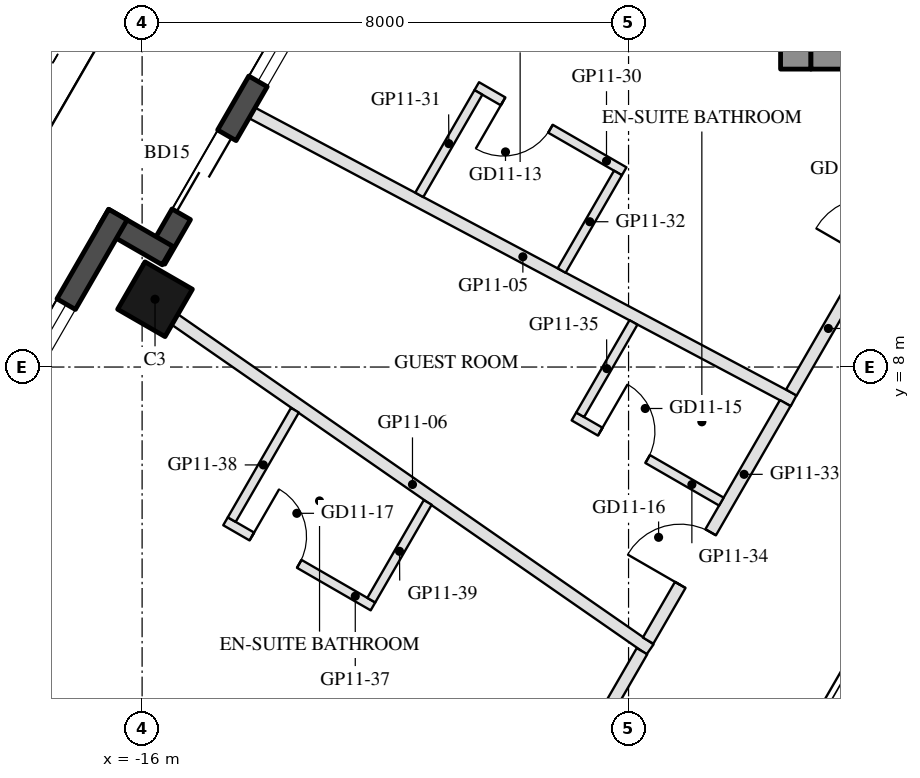
"""IFC4 building model, lengths in metres.
Left out: names, types, materials, properties, quantities, classifications, styles, units other than length and angle.
Written with IfcOpenShell. Run it as: python <this file> out.ifc"""

import sys

from ifc_helpers import new_model, si_unit, direction, frame, frame_2d, origin, origin_2d, place, context, subcontext, project, spatial, rectangle, hollow_rectangle, extrude, element, fill, save


model = new_model("IFC4")
c1 = context("Model", 3, precision=1e-05, world=origin(), true_north=direction((0.0, 1.0)))
c2 = subcontext(c1, "Body", "Model", "MODEL_VIEW")
j1 = project(units=[si_unit("LENGTHUNIT", "METRE"), si_unit("PLANEANGLEUNIT", "RADIAN")], contexts=[c1])
p1 = place(None, origin())
s1 = spatial("IfcSite", under=j1, at=p1, CompositionType="ELEMENT")
p2 = place(p1, origin())
s2 = spatial("IfcBuilding", under=s1, at=p2, CompositionType="ELEMENT")
p3 = place(p2, frame((0.0, 0.0, 124.2)))
s3 = spatial("IfcBuildingStorey", under=s2, at=p3, CompositionType="ELEMENT", Elevation=124.2)
p4 = place(p3, frame((-15.788, 9.115, 0.0), z_axis=(0.0, 0.0, 1.0), x_axis=(0.5, 0.866025403784, 0.0)))
e1 = element("IfcColumn", 1, at=p4, inside=s3, PredefinedType="COLUMN", context=c2, shape_type="SweptSolid", body=[
    extrude(hollow_rectangle(XDim=0.9, YDim=0.9, WallThickness=0.04, at=origin_2d()), origin(), (0.0, 0.0, 1.0), 3.7),
])
p5 = place(p3, frame((-12.409, 15.617, 0.0), z_axis=(0.0, 0.0, 1.0), x_axis=(-0.500003597184, -0.866023326939, 0.0)))
e2 = element("IfcWall", 2, at=p5, inside=s3, PredefinedType="SOLIDWALL", context=c2, shape_type="SweptSolid", body=[
    extrude(rectangle(XDim=6.74, YDim=0.35, at=frame_2d((3.37, 0.0))), origin(), (0.0, 0.0, 1.0), 3.55),
])
p6 = place(p5, frame((0.77, 0.0, 0.3)))
e3 = element("IfcOpeningElement", 3, at=p6, cuts=e2, PredefinedType="OPENING", context=c2, shape_type="SweptSolid", body=[
    extrude(rectangle(XDim=2.6, YDim=2.65, at=frame_2d((1.3, 1.325))), frame((0.0, 0.185, 0.0), z_axis=(0.0, -1.0, 0.0), x_axis=(1.0, 0.0, 0.0)), (0.0, 0.0, 1.0), 0.37),
])
p7 = place(p5, frame((4.394, 0.0, 0.0)))
e4 = element("IfcOpeningElement", 4, at=p7, cuts=e2, PredefinedType="OPENING", context=c2, shape_type="SweptSolid", body=[
    extrude(rectangle(XDim=1.5, YDim=2.4, at=frame_2d((0.75, 1.2))), frame((0.0, 0.185, 0.0), z_axis=(0.0, -1.0, 0.0), x_axis=(1.0, 0.0, 0.0)), (0.0, 0.0, 1.0), 0.37),
])
p8 = place(p3, frame((-15.581, 9.833, 0.0), z_axis=(0.0, 0.0, 1.0), x_axis=(-0.866055662726, 0.499947586314, 0.0)))
e5 = element("IfcWall", 5, at=p8, inside=s3, PredefinedType="SOLIDWALL", context=c2, shape_type="SweptSolid", body=[
    extrude(rectangle(XDim=1.22, YDim=0.35, at=frame_2d((0.61, 0.0))), origin(), (0.0, 0.0, 1.0), 3.55),
])
p9 = place(p3, frame((-16.398, 10.507, 0.0), z_axis=(0.0, 0.0, 1.0), x_axis=(-0.499999142773, -0.866025898704, 0.0)))
e6 = element("IfcWall", 6, at=p9, inside=s3, PredefinedType="SOLIDWALL", context=c2, shape_type="SweptSolid", body=[
    extrude(rectangle(XDim=9.7, YDim=0.35, at=frame_2d((4.85, 0.0))), origin(), (0.0, 0.0, 1.0), 3.55),
])
p10 = place(p9, frame((5.6, 0.0, 0.0)))
e7 = element("IfcOpeningElement", 7, at=p10, cuts=e6, PredefinedType="OPENING", context=c2, shape_type="SweptSolid", body=[
    extrude(rectangle(XDim=2.4, YDim=2.4, at=frame_2d((1.2, 1.2))), frame((0.0, 0.185, 0.0), z_axis=(0.0, -1.0, 0.0), x_axis=(1.0, 0.0, 0.0)), (0.0, 0.0, 1.0), 0.37),
])
p11 = place(p9, frame((1.7, 0.0, 0.3)))
e8 = element("IfcOpeningElement", 8, at=p11, cuts=e6, PredefinedType="OPENING", context=c2, shape_type="SweptSolid", body=[
    extrude(rectangle(XDim=1.6, YDim=2.65, at=frame_2d((0.8, 1.325))), frame((0.0, 0.185, 0.0), z_axis=(0.0, -1.0, 0.0), x_axis=(1.0, 0.0, 0.0)), (0.0, 0.0, 1.0), 0.37),
])
p12 = place(p9, frame((3.6, 0.0, 0.3)))
e9 = element("IfcOpeningElement", 9, at=p12, cuts=e6, PredefinedType="OPENING", context=c2, shape_type="SweptSolid", body=[
    extrude(rectangle(XDim=1.6, YDim=2.65, at=frame_2d((0.8, 1.325))), frame((0.0, 0.185, 0.0), z_axis=(0.0, -1.0, 0.0), x_axis=(1.0, 0.0, 0.0)), (0.0, 0.0, 1.0), 0.37),
])
p13 = place(p3, frame((-5.25, 12.9, 0.0), z_axis=(0.0, 0.0, 1.0), x_axis=(0.0, 1.0, 0.0)))
e10 = element("IfcWall", 10, at=p13, inside=s3, PredefinedType="SHEAR", context=c2, shape_type="SweptSolid", body=[
    extrude(rectangle(XDim=14.837, YDim=0.5, at=frame_2d((7.418, 0.0))), origin(), (0.0, 0.0, 1.0), 3.5),
])
p14 = place(p3, frame((5.0, 13.1, 0.0), z_axis=(0.0, 0.0, 1.0), x_axis=(-1.0, 0.0, 0.0)))
e11 = element("IfcWall", 11, at=p14, inside=s3, PredefinedType="SHEAR", context=c2, shape_type="SweptSolid", body=[
    extrude(rectangle(XDim=10.0, YDim=0.4, at=frame_2d((5.0, 0.0))), origin(), (0.0, 0.0, 1.0), 3.5),
])
p15 = place(p14, frame((3.55, 0.0, 0.0)))
e12 = element("IfcOpeningElement", 12, at=p15, cuts=e11, PredefinedType="OPENING", context=c2, shape_type="SweptSolid", body=[
    extrude(rectangle(XDim=1.1, YDim=2.1, at=frame_2d((0.55, 1.05))), frame((0.0, 0.21, 0.0), z_axis=(0.0, -1.0, 0.0), x_axis=(1.0, 0.0, 0.0)), (0.0, 0.0, 1.0), 0.42),
])
p16 = place(p14, frame((5.85, 0.0, 0.0)))
e13 = element("IfcOpeningElement", 13, at=p16, cuts=e11, PredefinedType="OPENING", context=c2, shape_type="SweptSolid", body=[
    extrude(rectangle(XDim=1.4, YDim=2.1, at=frame_2d((0.7, 1.05))), frame((0.0, 0.21, 0.0), z_axis=(0.0, -1.0, 0.0), x_axis=(1.0, 0.0, 0.0)), (0.0, 0.0, 1.0), 0.42),
])
p17 = place(p3, frame((-14.192, 12.179, 0.0), z_axis=(0.0, 0.0, 1.0), x_axis=(0.883106944183, -0.469171743753, 0.0)))
e14 = element("IfcWall", 14, at=p17, inside=s3, PredefinedType="PARTITIONING", context=c2, shape_type="SweptSolid", body=[
    extrude(rectangle(XDim=10.086, YDim=0.2, at=frame_2d((5.043, 0.0))), origin(), (0.0, 0.0, 1.0), 2.95),
])
p18 = place(p3, frame((-15.46, 8.781, 0.0), z_axis=(0.0, 0.0, 1.0), x_axis=(0.82142273434, -0.570319815113, 0.0)))
e15 = element("IfcWall", 15, at=p18, inside=s3, PredefinedType="PARTITIONING", context=c2, shape_type="SweptSolid", body=[
    extrude(rectangle(XDim=9.513, YDim=0.2, at=frame_2d((4.756, 0.0))), origin(), (0.0, 0.0, 1.0), 2.95),
])
p19 = place(p3, frame((-5.323, 7.581, 0.0), z_axis=(0.0, 0.0, 1.0), x_axis=(0.49998410452, 0.866034580849, 0.0)))
e16 = element("IfcWall", 16, at=p19, inside=s3, PredefinedType="PARTITIONING", context=c2, shape_type="SweptSolid", body=[
    extrude(rectangle(XDim=6.085, YDim=0.2, at=frame_2d((3.042, 0.0))), origin(), (0.0, 0.0, 1.0), 2.95),
])
p20 = place(p19, frame((2.542, 0.0, 0.0)))
e17 = element("IfcOpeningElement", 17, at=p20, cuts=e16, PredefinedType="OPENING", context=c2, shape_type="SweptSolid", body=[
    extrude(rectangle(XDim=1.0, YDim=2.1, at=frame_2d((0.5, 1.05))), frame((0.0, 0.11, 0.0), z_axis=(0.0, -1.0, 0.0), x_axis=(1.0, 0.0, 0.0)), (0.0, 0.0, 1.0), 0.22),
])
p21 = place(p3, frame((-8.072, 11.219, 0.0), z_axis=(0.0, 0.0, 1.0), x_axis=(-0.866034573852, 0.49998411664, 0.0)))
e18 = element("IfcWall", 18, at=p21, inside=s3, PredefinedType="PARTITIONING", context=c2, shape_type="SweptSolid", body=[
    extrude(rectangle(XDim=2.8, YDim=0.15, at=frame_2d((1.4, 0.0))), origin(), (0.0, 0.0, 1.0), 3.55),
])
p22 = place(p21, frame((1.4, 0.0, 0.0)))
e19 = element("IfcOpeningElement", 19, at=p22, cuts=e18, PredefinedType="OPENING", context=c2, shape_type="SweptSolid", body=[
    extrude(rectangle(XDim=0.9, YDim=2.1, at=frame_2d((0.45, 1.05))), frame((0.0, 0.085, 0.0), z_axis=(0.0, -1.0, 0.0), x_axis=(1.0, 0.0, 0.0)), (0.0, 0.0, 1.0), 0.17),
])
p23 = place(p3, frame((-10.469, 12.517, 0.0), z_axis=(0.0, 0.0, 1.0), x_axis=(-0.500051850797, -0.865995465643, 0.0)))
e20 = element("IfcWall", 20, at=p23, inside=s3, PredefinedType="PARTITIONING", context=c2, shape_type="SweptSolid", body=[
    extrude(rectangle(XDim=1.946, YDim=0.15, at=frame_2d((0.973, 0.0))), origin(), (0.0, 0.0, 1.0), 2.95),
])
p24 = place(p3, frame((-8.174, 11.192, 0.0), z_axis=(0.0, 0.0, 1.0), x_axis=(-0.500022870649, -0.866012199007, 0.0)))
e21 = element("IfcWall", 21, at=p24, inside=s3, PredefinedType="PARTITIONING", context=c2, shape_type="SweptSolid", body=[
    extrude(rectangle(XDim=1.853, YDim=0.15, at=frame_2d((0.926, 0.0))), origin(), (0.0, 0.0, 1.0), 2.95),
])
p25 = place(p3, frame((-7.679, 3.5, 0.0), z_axis=(0.0, 0.0, 1.0), x_axis=(0.500026934738, 0.866009852448, 0.0)))
e22 = element("IfcWall", 22, at=p25, inside=s3, PredefinedType="PARTITIONING", context=c2, shape_type="SweptSolid", body=[
    extrude(rectangle(XDim=4.511, YDim=0.2, at=frame_2d((2.256, 0.0))), origin(), (0.0, 0.0, 1.0), 2.95),
])
p26 = place(p25, frame((1.058, 0.0, 0.0)))
e23 = element("IfcOpeningElement", 23, at=p26, cuts=e22, PredefinedType="OPENING", context=c2, shape_type="SweptSolid", body=[
    extrude(rectangle(XDim=1.0, YDim=2.1, at=frame_2d((0.5, 1.05))), frame((0.0, 0.11, 0.0), z_axis=(0.0, -1.0, 0.0), x_axis=(1.0, 0.0, 0.0)), (0.0, 0.0, 1.0), 0.22),
])
p27 = place(p3, frame((-8.899, 7.187, 0.0), z_axis=(0.0, 0.0, 1.0), x_axis=(0.866056369097, -0.49994636267, 0.0)))
e24 = element("IfcWall", 24, at=p27, inside=s3, PredefinedType="PARTITIONING", context=c2, shape_type="SweptSolid", body=[
    extrude(rectangle(XDim=2.8, YDim=0.15, at=frame_2d((1.4, 0.0))), origin(), (0.0, 0.0, 1.0), 3.55),
])
p28 = place(p27, frame((0.5, 0.0, 0.0)))
e25 = element("IfcOpeningElement", 25, at=p28, cuts=e24, PredefinedType="OPENING", context=c2, shape_type="SweptSolid", body=[
    extrude(rectangle(XDim=0.9, YDim=2.1, at=frame_2d((0.45, 1.05))), frame((0.0, 0.085, 0.0), z_axis=(0.0, -1.0, 0.0), x_axis=(1.0, 0.0, 0.0)), (0.0, 0.0, 1.0), 0.17),
])
p29 = place(p3, frame((-7.919, 8.734, 0.0), z_axis=(0.0, 0.0, 1.0), x_axis=(-0.499971461383, -0.866041879935, 0.0)))
e26 = element("IfcWall", 26, at=p29, inside=s3, PredefinedType="PARTITIONING", context=c2, shape_type="SweptSolid", body=[
    extrude(rectangle(XDim=1.754, YDim=0.15, at=frame_2d((0.877, 0.0))), origin(), (0.0, 0.0, 1.0), 3.55),
])
p30 = place(p3, frame((-12.269, -4.45, 0.0), z_axis=(0.0, 0.0, 1.0), x_axis=(0.500004878216, 0.866022587327, 0.0)))
e27 = element("IfcWall", 27, at=p30, inside=s3, PredefinedType="PARTITIONING", context=c2, shape_type="SweptSolid", body=[
    extrude(rectangle(XDim=8.979, YDim=0.2, at=frame_2d((4.49, 0.0))), origin(), (0.0, 0.0, 1.0), 2.95),
])
p31 = place(p30, frame((3.99, 0.0, 0.0)))
e28 = element("IfcOpeningElement", 28, at=p31, cuts=e27, PredefinedType="OPENING", context=c2, shape_type="SweptSolid", body=[
    extrude(rectangle(XDim=1.0, YDim=2.1, at=frame_2d((0.5, 1.05))), frame((0.0, 0.11, 0.0), z_axis=(0.0, -1.0, 0.0), x_axis=(1.0, 0.0, 0.0)), (0.0, 0.0, 1.0), 0.22),
])
p32 = place(p3, frame((-14.628, 5.463, 0.0), z_axis=(0.0, 0.0, 1.0), x_axis=(0.866056369097, -0.49994636267, 0.0)))
e29 = element("IfcWall", 29, at=p32, inside=s3, PredefinedType="PARTITIONING", context=c2, shape_type="SweptSolid", body=[
    extrude(rectangle(XDim=2.8, YDim=0.15, at=frame_2d((1.4, 0.0))), origin(), (0.0, 0.0, 1.0), 3.55),
])
p33 = place(p32, frame((0.5, 0.0, 0.0)))
e30 = element("IfcOpeningElement", 30, at=p33, cuts=e29, PredefinedType="OPENING", context=c2, shape_type="SweptSolid", body=[
    extrude(rectangle(XDim=0.9, YDim=2.1, at=frame_2d((0.45, 1.05))), frame((0.0, 0.085, 0.0), z_axis=(0.0, -1.0, 0.0), x_axis=(1.0, 0.0, 0.0)), (0.0, 0.0, 1.0), 0.17),
])
p34 = place(p3, frame((-13.487, 7.29, 0.0), z_axis=(0.0, 0.0, 1.0), x_axis=(-0.500044586128, -0.865999660441, 0.0)))
e31 = element("IfcWall", 31, at=p34, inside=s3, PredefinedType="PARTITIONING", context=c2, shape_type="SweptSolid", body=[
    extrude(rectangle(XDim=2.077, YDim=0.15, at=frame_2d((1.039, 0.0))), origin(), (0.0, 0.0, 1.0), 3.55),
])
p35 = place(p3, frame((-11.303, 5.773, 0.0), z_axis=(0.0, 0.0, 1.0), x_axis=(-0.500071598593, -0.865984062371, 0.0)))
e32 = element("IfcWall", 32, at=p35, inside=s3, PredefinedType="PARTITIONING", context=c2, shape_type="SweptSolid", body=[
    extrude(rectangle(XDim=1.856, YDim=0.15, at=frame_2d((0.928, 0.0))), origin(), (0.0, 0.0, 1.0), 3.55),
])
p36 = place(p6, origin())
e33 = element("IfcWindow", 33, at=p36, inside=s3, PartitioningType="SINGLE_PANEL", PredefinedType="WINDOW", context=c2, shape_type="SweptSolid", body=[
    extrude(rectangle(XDim=2.6, YDim=2.65, at=frame_2d((1.3, 1.325))), frame((0.0, 0.03, 0.0), z_axis=(0.0, -1.0, 0.0), x_axis=(1.0, 0.0, 0.0)), (0.0, 0.0, 1.0), 0.06),
])
fill(e3, e33)
p37 = place(p7, frame((1.5, 0.0, 0.0), z_axis=(0.0, 0.0, 1.0), x_axis=(-1.0, 0.0, 0.0)))
e34 = element("IfcDoor", 34, at=p37, inside=s3, OperationType="SLIDING_TO_LEFT", PredefinedType="DOOR", context=c2, shape_type="SweptSolid", body=[
    extrude(rectangle(XDim=1.5, YDim=2.4, at=frame_2d((0.75, 1.2))), frame((0.0, 0.025, 0.0), z_axis=(0.0, -1.0, 0.0), x_axis=(1.0, 0.0, 0.0)), (0.0, 0.0, 1.0), 0.05),
])
fill(e4, e34)
p38 = place(p11, origin())
e35 = element("IfcWindow", 35, at=p38, inside=s3, PartitioningType="SINGLE_PANEL", PredefinedType="WINDOW", context=c2, shape_type="SweptSolid", body=[
    extrude(rectangle(XDim=1.6, YDim=2.65, at=frame_2d((0.8, 1.325))), frame((0.0, 0.03, 0.0), z_axis=(0.0, -1.0, 0.0), x_axis=(1.0, 0.0, 0.0)), (0.0, 0.0, 1.0), 0.06),
])
fill(e8, e35)
p39 = place(p22, origin())
e36 = element("IfcDoor", 36, at=p39, inside=s3, OperationType="SINGLE_SWING_RIGHT", PredefinedType="DOOR", context=c2, shape_type="SweptSolid", body=[
    extrude(rectangle(XDim=0.9, YDim=2.1, at=frame_2d((0.45, 1.05))), frame((0.0, 0.025, 0.0), z_axis=(0.0, -1.0, 0.0), x_axis=(1.0, 0.0, 0.0)), (0.0, 0.0, 1.0), 0.05),
])
fill(e19, e36)
p40 = place(p28, origin())
e37 = element("IfcDoor", 37, at=p40, inside=s3, OperationType="SINGLE_SWING_LEFT", PredefinedType="DOOR", context=c2, shape_type="SweptSolid", body=[
    extrude(rectangle(XDim=0.9, YDim=2.1, at=frame_2d((0.45, 1.05))), frame((0.0, 0.025, 0.0), z_axis=(0.0, -1.0, 0.0), x_axis=(1.0, 0.0, 0.0)), (0.0, 0.0, 1.0), 0.05),
])
fill(e25, e37)
p41 = place(p26, origin())
e38 = element("IfcDoor", 38, at=p41, inside=s3, OperationType="SINGLE_SWING_LEFT", PredefinedType="DOOR", context=c2, shape_type="SweptSolid", body=[
    extrude(rectangle(XDim=1.0, YDim=2.1, at=frame_2d((0.5, 1.05))), frame((0.0, 0.025, 0.0), z_axis=(0.0, -1.0, 0.0), x_axis=(1.0, 0.0, 0.0)), (0.0, 0.0, 1.0), 0.05),
])
fill(e23, e38)
p42 = place(p33, origin())
e39 = element("IfcDoor", 39, at=p42, inside=s3, OperationType="SINGLE_SWING_LEFT", PredefinedType="DOOR", context=c2, shape_type="SweptSolid", body=[
    extrude(rectangle(XDim=0.9, YDim=2.1, at=frame_2d((0.45, 1.05))), frame((0.0, 0.025, 0.0), z_axis=(0.0, -1.0, 0.0), x_axis=(1.0, 0.0, 0.0)), (0.0, 0.0, 1.0), 0.05),
])
fill(e30, e39)
save(model, sys.argv[1])
